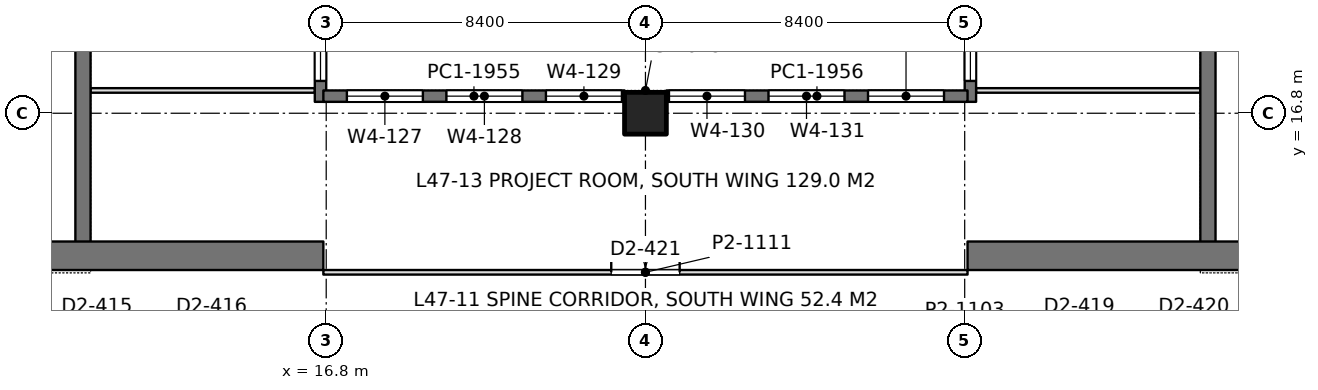
"""IFC4 building model, lengths in metres.
Left out: names, types, materials, properties, quantities, classifications, styles, units other than length and angle.
Written with IfcOpenShell. Run it as: python <this file> out.ifc"""

import sys

from ifc_helpers import new_model, si_unit, direction, frame, frame_2d, origin, origin_2d, place, context, subcontext, project, spatial, rectangle, extrude, element, fill, save


model = new_model("IFC4")
c1 = context("Model", 3, precision=1e-05, world=origin(), true_north=direction((0.0, 1.0)))
c2 = subcontext(c1, "Body", "Model", "MODEL_VIEW")
j1 = project(units=[si_unit("LENGTHUNIT", "METRE"), si_unit("PLANEANGLEUNIT", "RADIAN")], contexts=[c1])
p1 = place(None, origin())
s1 = spatial("IfcSite", under=j1, at=p1, CompositionType="ELEMENT")
p2 = place(p1, origin())
s2 = spatial("IfcBuilding", under=s1, at=p2, CompositionType="ELEMENT")
p3 = place(p2, frame((0.0, 0.0, 207.0)))
s3 = spatial("IfcBuildingStorey", under=s2, at=p3, CompositionType="ELEMENT", Elevation=207.0)
p4 = place(p3, frame((25.2, 16.8, 0.0), z_axis=(0.0, 0.0, 1.0), x_axis=(1.0, 0.0, 0.0)))
e1 = element("IfcColumn", 1, at=p4, inside=s3, PredefinedType="COLUMN", context=c2, shape_type="SweptSolid", body=[
    extrude(rectangle(XDim=1.1, YDim=1.1, at=origin_2d()), origin(), (0.0, 0.0, 1.0), 4.2),
])
p5 = place(p3, frame((-1.125, 13.05, 0.0), z_axis=(0.0, 0.0, 1.0), x_axis=(1.0, 0.0, 0.0)))
e2 = element("IfcWall", 2, at=p5, inside=s3, PredefinedType="SHEAR", context=c2, shape_type="SweptSolid", body=[
    extrude(rectangle(XDim=17.85, YDim=0.75, at=frame_2d((8.925, 0.0))), origin(), (0.0, 0.0, 1.0), 4.2),
])
p6 = place(p5, frame((8.875, 0.0, 0.0)))
e3 = element("IfcOpeningElement", 3, at=p6, cuts=e2, PredefinedType="OPENING", context=c2, shape_type="SweptSolid", body=[
    extrude(rectangle(XDim=1.8, YDim=2.4, at=frame_2d((0.9, 1.2))), frame((0.0, 0.385, 0.0), z_axis=(0.0, -1.0, 0.0), x_axis=(1.0, 0.0, 0.0)), (0.0, 0.0, 1.0), 0.77),
])
p7 = place(p3, frame((10.4, 13.05, 0.0), z_axis=(0.0, 0.0, 1.0), x_axis=(0.0, 1.0, 0.0)))
e4 = element("IfcWall", 4, at=p7, inside=s3, PredefinedType="SHEAR", context=c2, shape_type="SweptSolid", body=[
    extrude(rectangle(XDim=24.3, YDim=0.4, at=frame_2d((12.15, 0.0))), origin(), (0.0, 0.0, 1.0), 4.2),
])
p8 = place(p7, frame((15.75, 0.0, 0.0)))
e5 = element("IfcOpeningElement", 5, at=p8, cuts=e4, PredefinedType="OPENING", context=c2, shape_type="SweptSolid", body=[
    extrude(rectangle(XDim=1.1, YDim=2.2, at=frame_2d((0.55, 1.1))), frame((0.0, 0.21, 0.0), z_axis=(0.0, -1.0, 0.0), x_axis=(1.0, 0.0, 0.0)), (0.0, 0.0, 1.0), 0.42),
])
p9 = place(p7, frame((18.6, 0.0, 0.0)))
e6 = element("IfcOpeningElement", 6, at=p9, cuts=e4, PredefinedType="OPENING", context=c2, shape_type="SweptSolid", body=[
    extrude(rectangle(XDim=1.1, YDim=2.2, at=frame_2d((0.55, 1.1))), frame((0.0, 0.21, 0.0), z_axis=(0.0, -1.0, 0.0), x_axis=(1.0, 0.0, 0.0)), (0.0, 0.0, 1.0), 0.42),
])
p10 = place(p7, frame((21.45, 0.0, 0.0)))
e7 = element("IfcOpeningElement", 7, at=p10, cuts=e4, PredefinedType="OPENING", context=c2, shape_type="SweptSolid", body=[
    extrude(rectangle(XDim=1.1, YDim=2.2, at=frame_2d((0.55, 1.1))), frame((0.0, 0.21, 0.0), z_axis=(0.0, -1.0, 0.0), x_axis=(1.0, 0.0, 0.0)), (0.0, 0.0, 1.0), 0.42),
])
p11 = place(p7, frame((8.65, 0.0, 0.0)))
e8 = element("IfcOpeningElement", 8, at=p11, cuts=e4, PredefinedType="OPENING", context=c2, shape_type="SweptSolid", body=[
    extrude(rectangle(XDim=1.8, YDim=2.4, at=frame_2d((0.9, 1.2))), frame((0.0, 0.21, 0.0), z_axis=(0.0, -1.0, 0.0), x_axis=(1.0, 0.0, 0.0)), (0.0, 0.0, 1.0), 0.42),
])
p12 = place(p3, frame((33.675, 13.05, 0.0), z_axis=(0.0, 0.0, 1.0), x_axis=(1.0, 0.0, 0.0)))
e9 = element("IfcWall", 9, at=p12, inside=s3, PredefinedType="SHEAR", context=c2, shape_type="SweptSolid", body=[
    extrude(rectangle(XDim=17.85, YDim=0.75, at=frame_2d((8.925, 0.0))), origin(), (0.0, 0.0, 1.0), 4.2),
])
p13 = place(p12, frame((7.175, 0.0, 0.0)))
e10 = element("IfcOpeningElement", 10, at=p13, cuts=e9, PredefinedType="OPENING", context=c2, shape_type="SweptSolid", body=[
    extrude(rectangle(XDim=1.8, YDim=2.4, at=frame_2d((0.9, 1.2))), frame((0.0, 0.385, 0.0), z_axis=(0.0, -1.0, 0.0), x_axis=(1.0, 0.0, 0.0)), (0.0, 0.0, 1.0), 0.77),
])
p14 = place(p3, frame((40.0, 13.05, 0.0), z_axis=(0.0, 0.0, 1.0), x_axis=(0.0, 1.0, 0.0)))
e11 = element("IfcWall", 11, at=p14, inside=s3, PredefinedType="SHEAR", context=c2, shape_type="SweptSolid", body=[
    extrude(rectangle(XDim=24.3, YDim=0.4, at=frame_2d((12.15, 0.0))), origin(), (0.0, 0.0, 1.0), 4.2),
])
p15 = place(p14, frame((15.75, 0.0, 0.0)))
e12 = element("IfcOpeningElement", 12, at=p15, cuts=e11, PredefinedType="OPENING", context=c2, shape_type="SweptSolid", body=[
    extrude(rectangle(XDim=1.1, YDim=2.2, at=frame_2d((0.55, 1.1))), frame((0.0, 0.21, 0.0), z_axis=(0.0, -1.0, 0.0), x_axis=(1.0, 0.0, 0.0)), (0.0, 0.0, 1.0), 0.42),
])
p16 = place(p14, frame((18.6, 0.0, 0.0)))
e13 = element("IfcOpeningElement", 13, at=p16, cuts=e11, PredefinedType="OPENING", context=c2, shape_type="SweptSolid", body=[
    extrude(rectangle(XDim=1.1, YDim=2.2, at=frame_2d((0.55, 1.1))), frame((0.0, 0.21, 0.0), z_axis=(0.0, -1.0, 0.0), x_axis=(1.0, 0.0, 0.0)), (0.0, 0.0, 1.0), 0.42),
])
p17 = place(p14, frame((21.45, 0.0, 0.0)))
e14 = element("IfcOpeningElement", 14, at=p17, cuts=e11, PredefinedType="OPENING", context=c2, shape_type="SweptSolid", body=[
    extrude(rectangle(XDim=1.1, YDim=2.2, at=frame_2d((0.55, 1.1))), frame((0.0, 0.21, 0.0), z_axis=(0.0, -1.0, 0.0), x_axis=(1.0, 0.0, 0.0)), (0.0, 0.0, 1.0), 0.42),
])
p18 = place(p14, frame((8.65, 0.0, 0.0)))
e15 = element("IfcOpeningElement", 15, at=p18, cuts=e11, PredefinedType="OPENING", context=c2, shape_type="SweptSolid", body=[
    extrude(rectangle(XDim=1.8, YDim=2.4, at=frame_2d((0.9, 1.2))), frame((0.0, 0.21, 0.0), z_axis=(0.0, -1.0, 0.0), x_axis=(1.0, 0.0, 0.0)), (0.0, 0.0, 1.0), 0.42),
])
p19 = place(p3, frame((16.65, 17.1, 0.0), z_axis=(0.0, 0.0, 1.0), x_axis=(0.0, 1.0, 0.0)))
e16 = element("IfcWall", 16, at=p19, inside=s3, PredefinedType="SOLIDWALL", context=c2, shape_type="SweptSolid", body=[
    extrude(rectangle(XDim=10.7, YDim=0.3, at=frame_2d((5.35, 0.0))), origin(), (0.0, 0.0, 1.0), 4.05),
])
p20 = place(p19, frame((0.55, 0.0, 0.9)))
e17 = element("IfcOpeningElement", 17, at=p20, cuts=e16, PredefinedType="OPENING", context=c2, shape_type="SweptSolid", body=[
    extrude(rectangle(XDim=2.0, YDim=1.9, at=frame_2d((1.0, 0.95))), frame((0.0, 0.16, 0.0), z_axis=(0.0, -1.0, 0.0), x_axis=(1.0, 0.0, 0.0)), (0.0, 0.0, 1.0), 0.32),
])
p21 = place(p19, frame((2.9, 0.0, 0.9)))
e18 = element("IfcOpeningElement", 18, at=p21, cuts=e16, PredefinedType="OPENING", context=c2, shape_type="SweptSolid", body=[
    extrude(rectangle(XDim=2.0, YDim=1.9, at=frame_2d((1.0, 0.95))), frame((0.0, 0.16, 0.0), z_axis=(0.0, -1.0, 0.0), x_axis=(1.0, 0.0, 0.0)), (0.0, 0.0, 1.0), 0.32),
])
p22 = place(p19, frame((7.675, 0.0, 0.9)))
e19 = element("IfcOpeningElement", 19, at=p22, cuts=e16, PredefinedType="OPENING", context=c2, shape_type="SweptSolid", body=[
    extrude(rectangle(XDim=2.0, YDim=1.9, at=frame_2d((1.0, 0.95))), frame((0.0, 0.16, 0.0), z_axis=(0.0, -1.0, 0.0), x_axis=(1.0, 0.0, 0.0)), (0.0, 0.0, 1.0), 0.32),
])
p23 = place(p3, frame((33.75, 17.1, 0.0), z_axis=(0.0, 0.0, 1.0), x_axis=(0.0, 1.0, 0.0)))
e20 = element("IfcWall", 20, at=p23, inside=s3, PredefinedType="SOLIDWALL", context=c2, shape_type="SweptSolid", body=[
    extrude(rectangle(XDim=10.7, YDim=0.3, at=frame_2d((5.35, 0.0))), origin(), (0.0, 0.0, 1.0), 4.05),
])
p24 = place(p23, frame((0.55, 0.0, 0.9)))
e21 = element("IfcOpeningElement", 21, at=p24, cuts=e20, PredefinedType="OPENING", context=c2, shape_type="SweptSolid", body=[
    extrude(rectangle(XDim=2.0, YDim=1.9, at=frame_2d((1.0, 0.95))), frame((0.0, 0.16, 0.0), z_axis=(0.0, -1.0, 0.0), x_axis=(1.0, 0.0, 0.0)), (0.0, 0.0, 1.0), 0.32),
])
p25 = place(p23, frame((2.9, 0.0, 0.9)))
e22 = element("IfcOpeningElement", 22, at=p25, cuts=e20, PredefinedType="OPENING", context=c2, shape_type="SweptSolid", body=[
    extrude(rectangle(XDim=2.0, YDim=1.9, at=frame_2d((1.0, 0.95))), frame((0.0, 0.16, 0.0), z_axis=(0.0, -1.0, 0.0), x_axis=(1.0, 0.0, 0.0)), (0.0, 0.0, 1.0), 0.32),
])
p26 = place(p23, frame((7.675, 0.0, 0.9)))
e23 = element("IfcOpeningElement", 23, at=p26, cuts=e20, PredefinedType="OPENING", context=c2, shape_type="SweptSolid", body=[
    extrude(rectangle(XDim=2.0, YDim=1.9, at=frame_2d((1.0, 0.95))), frame((0.0, 0.16, 0.0), z_axis=(0.0, -1.0, 0.0), x_axis=(1.0, 0.0, 0.0)), (0.0, 0.0, 1.0), 0.32),
])
p27 = place(p3, frame((16.725, 17.25, 0.0), z_axis=(0.0, 0.0, 1.0), x_axis=(1.0, 0.0, 0.0)))
e24 = element("IfcWall", 24, at=p27, inside=s3, PredefinedType="SOLIDWALL", context=c2, shape_type="SweptSolid", body=[
    extrude(rectangle(XDim=7.925, YDim=0.3, at=frame_2d((3.962, 0.0))), origin(), (0.0, 0.0, 1.0), 4.05),
])
p28 = place(p27, frame((0.619, 0.0, 0.9)))
e25 = element("IfcOpeningElement", 25, at=p28, cuts=e24, PredefinedType="OPENING", context=c2, shape_type="SweptSolid", body=[
    extrude(rectangle(XDim=2.0, YDim=1.9, at=frame_2d((1.0, 0.95))), frame((0.0, 0.16, 0.0), z_axis=(0.0, -1.0, 0.0), x_axis=(1.0, 0.0, 0.0)), (0.0, 0.0, 1.0), 0.32),
])
p29 = place(p27, frame((3.238, 0.0, 0.9)))
e26 = element("IfcOpeningElement", 26, at=p29, cuts=e24, PredefinedType="OPENING", context=c2, shape_type="SweptSolid", body=[
    extrude(rectangle(XDim=2.0, YDim=1.9, at=frame_2d((1.0, 0.95))), frame((0.0, 0.16, 0.0), z_axis=(0.0, -1.0, 0.0), x_axis=(1.0, 0.0, 0.0)), (0.0, 0.0, 1.0), 0.32),
])
p30 = place(p27, frame((5.856, 0.0, 0.9)))
e27 = element("IfcOpeningElement", 27, at=p30, cuts=e24, PredefinedType="OPENING", context=c2, shape_type="SweptSolid", body=[
    extrude(rectangle(XDim=2.0, YDim=1.9, at=frame_2d((1.0, 0.95))), frame((0.0, 0.16, 0.0), z_axis=(0.0, -1.0, 0.0), x_axis=(1.0, 0.0, 0.0)), (0.0, 0.0, 1.0), 0.32),
])
p31 = place(p3, frame((25.75, 17.25, 0.0), z_axis=(0.0, 0.0, 1.0), x_axis=(1.0, 0.0, 0.0)))
e28 = element("IfcWall", 28, at=p31, inside=s3, PredefinedType="SOLIDWALL", context=c2, shape_type="SweptSolid", body=[
    extrude(rectangle(XDim=7.925, YDim=0.3, at=frame_2d((3.962, 0.0))), origin(), (0.0, 0.0, 1.0), 4.05),
])
p32 = place(p31, frame((0.069, 0.0, 0.9)))
e29 = element("IfcOpeningElement", 29, at=p32, cuts=e28, PredefinedType="OPENING", context=c2, shape_type="SweptSolid", body=[
    extrude(rectangle(XDim=2.0, YDim=1.9, at=frame_2d((1.0, 0.95))), frame((0.0, 0.16, 0.0), z_axis=(0.0, -1.0, 0.0), x_axis=(1.0, 0.0, 0.0)), (0.0, 0.0, 1.0), 0.32),
])
p33 = place(p31, frame((2.688, 0.0, 0.9)))
e30 = element("IfcOpeningElement", 30, at=p33, cuts=e28, PredefinedType="OPENING", context=c2, shape_type="SweptSolid", body=[
    extrude(rectangle(XDim=2.0, YDim=1.9, at=frame_2d((1.0, 0.95))), frame((0.0, 0.16, 0.0), z_axis=(0.0, -1.0, 0.0), x_axis=(1.0, 0.0, 0.0)), (0.0, 0.0, 1.0), 0.32),
])
p34 = place(p31, frame((5.306, 0.0, 0.9)))
e31 = element("IfcOpeningElement", 31, at=p34, cuts=e28, PredefinedType="OPENING", context=c2, shape_type="SweptSolid", body=[
    extrude(rectangle(XDim=2.0, YDim=1.9, at=frame_2d((1.0, 0.95))), frame((0.0, 0.16, 0.0), z_axis=(0.0, -1.0, 0.0), x_axis=(1.0, 0.0, 0.0)), (0.0, 0.0, 1.0), 0.32),
])
for number, where, z_axis, x_axis in (
    (32, (10.598, 17.4, 0.0), (0.0, 0.0, 1.0), (1.0, 0.0, 0.0)),
    (33, (33.898, 17.4, 0.0), (0.0, 0.0, 1.0), (1.0, 0.0, 0.0)),
):
    element("IfcWall", number, at=place(p3, frame(where, z_axis=z_axis, x_axis=x_axis)), inside=s3, PredefinedType="PARTITIONING", context=c2, shape_type="SweptSolid", body=[
        extrude(rectangle(XDim=5.904, YDim=0.12, at=frame_2d((2.952, 0.0))), origin(), (0.0, 0.0, 1.0), 3.55),
    ])
p35 = place(p3, frame((16.725, 12.615, 0.0), z_axis=(0.0, 0.0, 1.0), x_axis=(1.0, 0.0, 0.0)))
e34 = element("IfcWall", 34, at=p35, inside=s3, PredefinedType="PARTITIONING", context=c2, shape_type="SweptSolid", body=[
    extrude(rectangle(XDim=16.95, YDim=0.12, at=frame_2d((8.475, 0.0))), origin(), (0.0, 0.0, 1.0), 3.55),
])
p36 = place(p35, frame((7.575, 0.0, 0.0)))
e35 = element("IfcOpeningElement", 35, at=p36, cuts=e34, PredefinedType="OPENING", context=c2, shape_type="SweptSolid", body=[
    extrude(rectangle(XDim=1.8, YDim=2.2, at=frame_2d((0.9, 1.1))), frame((0.0, 0.07, 0.0), z_axis=(0.0, -1.0, 0.0), x_axis=(1.0, 0.0, 0.0)), (0.0, 0.0, 1.0), 0.14),
])
p37 = place(p20, origin())
e36 = element("IfcWindow", 36, at=p37, inside=s3, PartitioningType="SINGLE_PANEL", PredefinedType="WINDOW", context=c2, shape_type="SweptSolid", body=[
    extrude(rectangle(XDim=2.0, YDim=1.9, at=frame_2d((1.0, 0.95))), frame((0.0, 0.03, 0.0), z_axis=(0.0, -1.0, 0.0), x_axis=(1.0, 0.0, 0.0)), (0.0, 0.0, 1.0), 0.06),
])
fill(e17, e36)
p38 = place(p24, origin())
e37 = element("IfcWindow", 37, at=p38, inside=s3, PartitioningType="SINGLE_PANEL", PredefinedType="WINDOW", context=c2, shape_type="SweptSolid", body=[
    extrude(rectangle(XDim=2.0, YDim=1.9, at=frame_2d((1.0, 0.95))), frame((0.0, 0.03, 0.0), z_axis=(0.0, -1.0, 0.0), x_axis=(1.0, 0.0, 0.0)), (0.0, 0.0, 1.0), 0.06),
])
fill(e21, e37)
p39 = place(p28, origin())
e38 = element("IfcWindow", 38, at=p39, inside=s3, PartitioningType="SINGLE_PANEL", PredefinedType="WINDOW", context=c2, shape_type="SweptSolid", body=[
    extrude(rectangle(XDim=2.0, YDim=1.9, at=frame_2d((1.0, 0.95))), frame((0.0, 0.03, 0.0), z_axis=(0.0, -1.0, 0.0), x_axis=(1.0, 0.0, 0.0)), (0.0, 0.0, 1.0), 0.06),
])
fill(e25, e38)
p40 = place(p29, origin())
e39 = element("IfcWindow", 39, at=p40, inside=s3, PartitioningType="SINGLE_PANEL", PredefinedType="WINDOW", context=c2, shape_type="SweptSolid", body=[
    extrude(rectangle(XDim=2.0, YDim=1.9, at=frame_2d((1.0, 0.95))), frame((0.0, 0.03, 0.0), z_axis=(0.0, -1.0, 0.0), x_axis=(1.0, 0.0, 0.0)), (0.0, 0.0, 1.0), 0.06),
])
fill(e26, e39)
p41 = place(p30, origin())
e40 = element("IfcWindow", 40, at=p41, inside=s3, PartitioningType="SINGLE_PANEL", PredefinedType="WINDOW", context=c2, shape_type="SweptSolid", body=[
    extrude(rectangle(XDim=2.0, YDim=1.9, at=frame_2d((1.0, 0.95))), frame((0.0, 0.03, 0.0), z_axis=(0.0, -1.0, 0.0), x_axis=(1.0, 0.0, 0.0)), (0.0, 0.0, 1.0), 0.06),
])
fill(e27, e40)
p42 = place(p32, origin())
e41 = element("IfcWindow", 41, at=p42, inside=s3, PartitioningType="SINGLE_PANEL", PredefinedType="WINDOW", context=c2, shape_type="SweptSolid", body=[
    extrude(rectangle(XDim=2.0, YDim=1.9, at=frame_2d((1.0, 0.95))), frame((0.0, 0.03, 0.0), z_axis=(0.0, -1.0, 0.0), x_axis=(1.0, 0.0, 0.0)), (0.0, 0.0, 1.0), 0.06),
])
fill(e29, e41)
p43 = place(p33, origin())
e42 = element("IfcWindow", 42, at=p43, inside=s3, PartitioningType="SINGLE_PANEL", PredefinedType="WINDOW", context=c2, shape_type="SweptSolid", body=[
    extrude(rectangle(XDim=2.0, YDim=1.9, at=frame_2d((1.0, 0.95))), frame((0.0, 0.03, 0.0), z_axis=(0.0, -1.0, 0.0), x_axis=(1.0, 0.0, 0.0)), (0.0, 0.0, 1.0), 0.06),
])
fill(e30, e42)
p44 = place(p34, origin())
e43 = element("IfcWindow", 43, at=p44, inside=s3, PartitioningType="SINGLE_PANEL", PredefinedType="WINDOW", context=c2, shape_type="SweptSolid", body=[
    extrude(rectangle(XDim=2.0, YDim=1.9, at=frame_2d((1.0, 0.95))), frame((0.0, 0.03, 0.0), z_axis=(0.0, -1.0, 0.0), x_axis=(1.0, 0.0, 0.0)), (0.0, 0.0, 1.0), 0.06),
])
fill(e31, e43)
p45 = place(p36, origin())
e44 = element("IfcDoor", 44, at=p45, inside=s3, OperationType="DOUBLE_DOOR_SINGLE_SWING", PredefinedType="DOOR", context=c2, shape_type="SweptSolid", body=[
    extrude(rectangle(XDim=1.8, YDim=2.2, at=frame_2d((0.9, 1.1))), frame((0.0, 0.025, 0.0), z_axis=(0.0, -1.0, 0.0), x_axis=(1.0, 0.0, 0.0)), (0.0, 0.0, 1.0), 0.05),
])
fill(e35, e44)
save(model, sys.argv[1])
